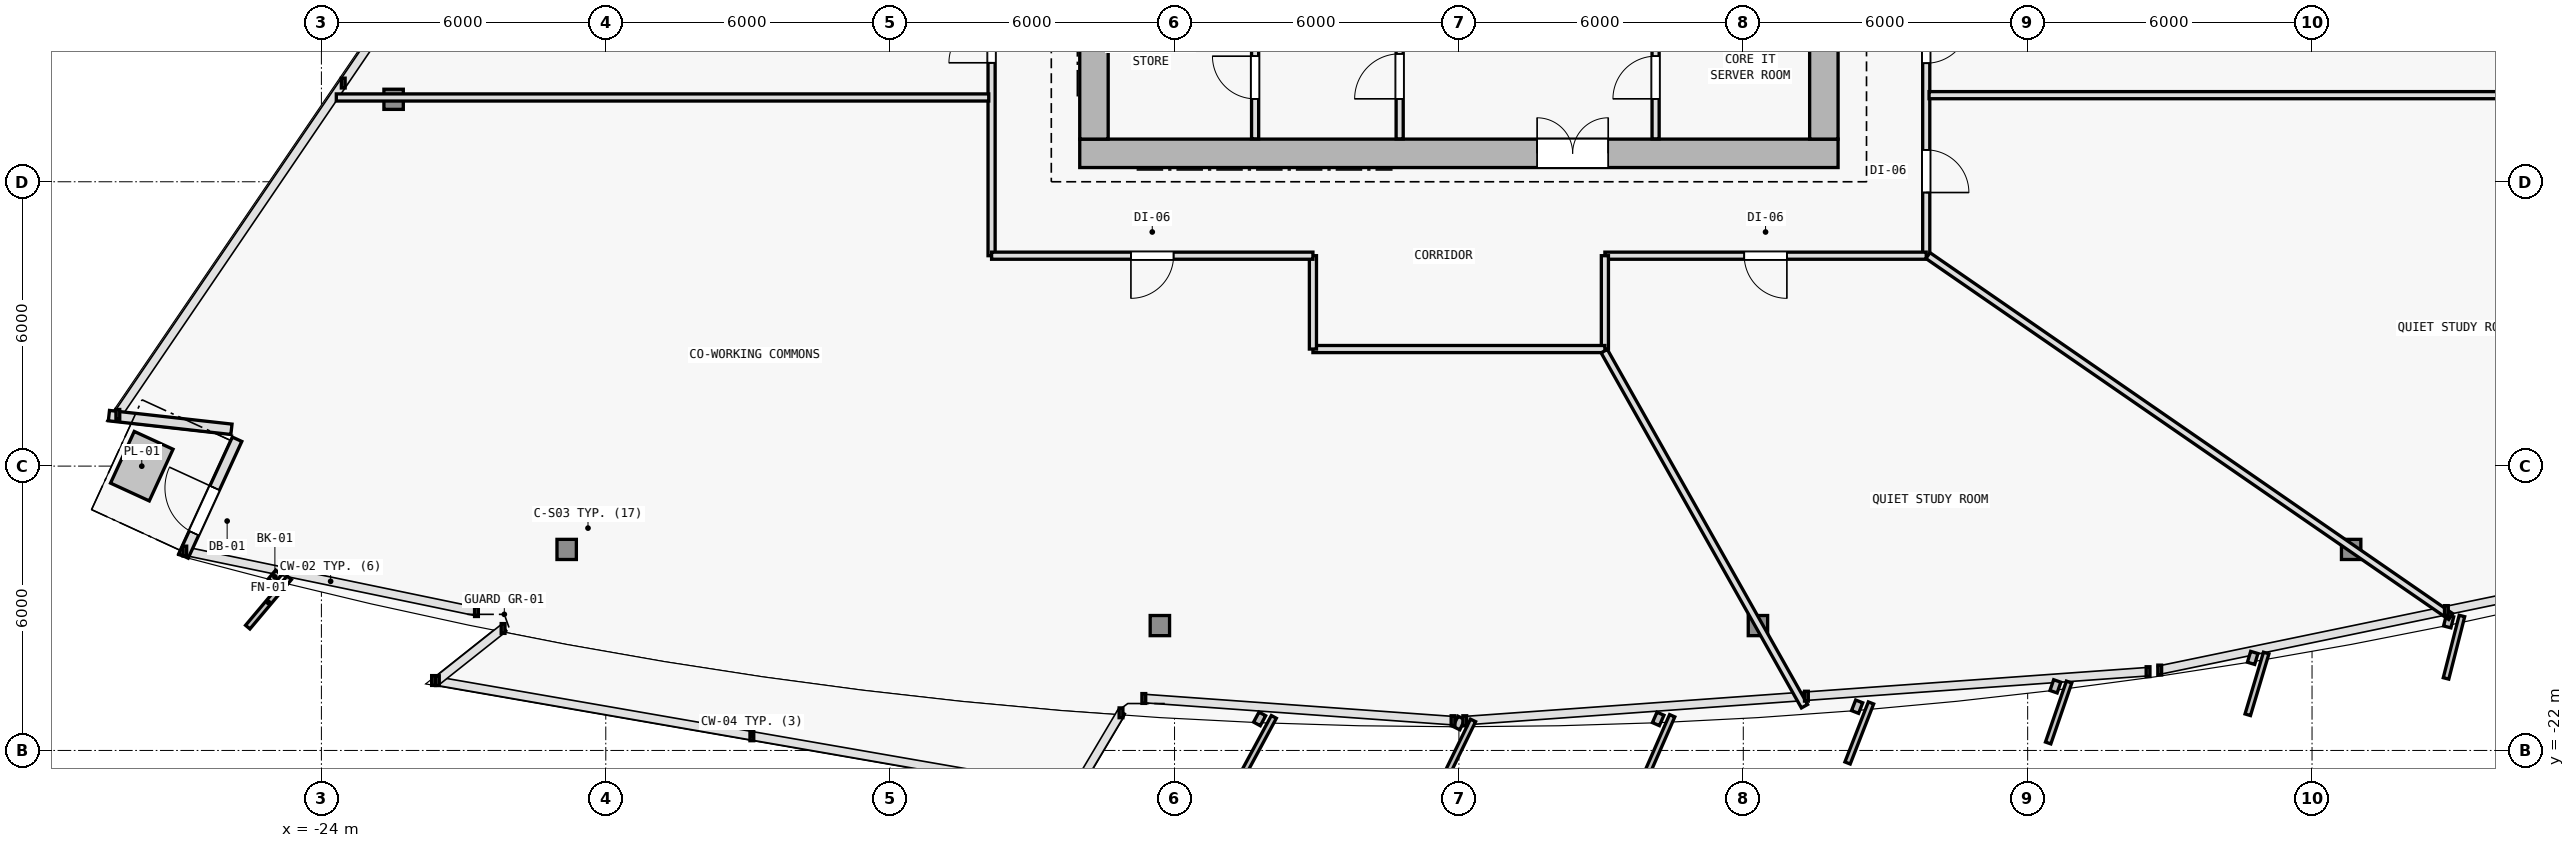
"""IFC4 building model, lengths in metres.
Left out: names, types, materials, properties, quantities, classifications, styles, units other than length and angle.
Written with IfcOpenShell. Run it as: python <this file> out.ifc"""

import sys

from ifc_helpers import new_model, si_unit, direction, frame, frame_2d, origin, origin_2d, place, context, subcontext, project, spatial, rectangle, i_section, extrude, element, fill, save


model = new_model("IFC4")
c1 = context("Model", 3, precision=1e-05, world=origin(), true_north=direction((0.0, 1.0)))
c2 = subcontext(c1, "Body", "Model", "MODEL_VIEW")
j1 = project(units=[si_unit("LENGTHUNIT", "METRE"), si_unit("PLANEANGLEUNIT", "RADIAN")], contexts=[c1])
p1 = place(None, origin())
s1 = spatial("IfcSite", under=j1, at=p1, CompositionType="ELEMENT")
p2 = place(p1, origin())
s2 = spatial("IfcBuilding", under=s1, at=p2, CompositionType="ELEMENT")
p3 = place(p2, frame((0.0, 0.0, 104.1)))
s3 = spatial("IfcBuildingStorey", under=s2, at=p3, CompositionType="ELEMENT", Elevation=104.1)
for number, where, z_axis, x_axis in (
    (1, (-7.7, -9.4, 0.0), (0.0, 0.0, 1.0), (1.0, 0.0, 0.0)),
    (2, (7.7, -9.4, 0.0), (0.0, 0.0, 1.0), (1.0, 0.0, 0.0)),
    (3, (0.0, -9.4, 0.0), (0.0, 0.0, 1.0), (1.0, 0.0, 0.0)),
):
    element("IfcColumn", number, at=place(p3, frame(where, z_axis=z_axis, x_axis=x_axis)), inside=s3, PredefinedType="COLUMN", context=c2, shape_type="SweptSolid", body=[
        extrude(i_section(OverallWidth=0.409, OverallDepth=0.425, WebThickness=0.021, FlangeThickness=0.034, FilletRadius=0.015, at=origin_2d()), origin(), (0.0, 0.0, 1.0), 3.6),
    ])
p4 = place(p3, frame((-18.825, -17.758, 0.005), z_axis=(0.020594893987, 0.033509183946, 0.999226193078), x_axis=(-0.851954850327, 0.523615252838, 0.0)))
e4 = element("IfcColumn", 4, at=p4, inside=s3, PredefinedType="COLUMN", context=c2, shape_type="SweptSolid", body=[
    extrude(i_section(OverallWidth=0.409, OverallDepth=0.425, WebThickness=0.021, FlangeThickness=0.034, FilletRadius=0.015, at=origin_2d()), origin(), (0.0, 0.0, 1.0), 3.592),
])
for number, where, z_axis, x_axis in (
    (5, (-6.309, -19.365, 0.005), (0.007, 0.035, 0.999), (-0.981, 0.193, 0.0)),
    (6, (6.309, -19.365, 0.005), (-0.007, 0.035, 0.999), (-0.981, -0.193, 0.0)),
):
    element("IfcColumn", number, at=place(p3, frame(where, z_axis=z_axis, x_axis=x_axis)), inside=s3, PredefinedType="COLUMN", context=c2, shape_type="SweptSolid", body=[
        extrude(i_section(OverallWidth=0.409, OverallDepth=0.425, WebThickness=0.021, FlangeThickness=0.034, FilletRadius=0.015, at=origin_2d()), origin(), (0.0, 0.0, 1.0), 3.592),
    ])
p5 = place(p3, frame((18.825, -17.758, 0.005), z_axis=(-0.020594893987, 0.033509183946, 0.999226193078), x_axis=(-0.851954850327, -0.523615252838, 0.0)))
e7 = element("IfcColumn", 7, at=p5, inside=s3, PredefinedType="COLUMN", context=c2, shape_type="SweptSolid", body=[
    extrude(i_section(OverallWidth=0.409, OverallDepth=0.425, WebThickness=0.021, FlangeThickness=0.034, FilletRadius=0.015, at=origin_2d()), origin(), (0.0, 0.0, 1.0), 3.592),
])
p6 = place(p3, frame((-22.477, -8.26, 0.005), z_axis=(0.025222486673, 0.021551289152, 0.999449532544), x_axis=(-0.649609258817, 0.760268249278, 0.0)))
e8 = element("IfcColumn", 8, at=p6, inside=s3, PredefinedType="COLUMN", context=c2, shape_type="SweptSolid", body=[
    extrude(i_section(OverallWidth=0.409, OverallDepth=0.425, WebThickness=0.021, FlangeThickness=0.034, FilletRadius=0.015, at=origin_2d()), origin(), (0.0, 0.0, 1.0), 3.591),
])
p7 = place(p3, frame((-25.898, -15.223, 0.0), z_axis=(0.0, 0.0, 1.0), x_axis=(-0.993827522589, 0.110936267041, 0.0)))
e9 = element("IfcWall", 9, at=p7, inside=s3, PredefinedType="SOLIDWALL", context=c2, shape_type="SweptSolid", body=[
    extrude(rectangle(XDim=2.601, YDim=0.22, at=frame_2d((1.301, 0.0))), origin(), (0.0, 0.0, 1.0), 3.35),
])
p8 = place(p3, frame((-26.911, -17.897, 0.0), z_axis=(0.0, 0.0, 1.0), x_axis=(0.417504190978, 0.908674997189, 0.0)))
e10 = element("IfcWall", 10, at=p8, inside=s3, PredefinedType="SOLIDWALL", context=c2, shape_type="SweptSolid", body=[
    extrude(rectangle(XDim=2.711, YDim=0.22, at=frame_2d((1.355, 0.0))), origin(), (0.0, 0.0, 1.0), 3.35),
])
p9 = place(p8, frame((0.531, 0.0, 0.0)))
e11 = element("IfcOpeningElement", 11, at=p9, cuts=e10, PredefinedType="OPENING", context=c2, shape_type="SweptSolid", body=[
    extrude(rectangle(XDim=1.05, YDim=2.15, at=frame_2d((0.525, 1.075))), frame((0.0, 0.12, 0.0), z_axis=(0.0, -1.0, 0.0), x_axis=(1.0, 0.0, 0.0)), (0.0, 0.0, 1.0), 0.24),
])
p10 = place(p3, frame((-8.0, -9.4, 0.0), z_axis=(0.0, 0.0, 1.0), x_axis=(1.0, 0.0, 0.0)))
e12 = element("IfcWall", 12, at=p10, inside=s3, PredefinedType="SHEAR", context=c2, shape_type="SweptSolid", body=[
    extrude(rectangle(XDim=16.0, YDim=0.6, at=frame_2d((8.0, 0.0))), origin(), (0.0, 0.0, 1.0), 3.35),
])
p11 = place(p10, frame((9.65, 0.0, 0.0)))
e13 = element("IfcOpeningElement", 13, at=p11, cuts=e12, PredefinedType="OPENING", context=c2, shape_type="SweptSolid", body=[
    extrude(rectangle(XDim=1.5, YDim=2.2, at=frame_2d((0.75, 1.1))), frame((0.0, 0.31, 0.0), z_axis=(0.0, -1.0, 0.0), x_axis=(1.0, 0.0, 0.0)), (0.0, 0.0, 1.0), 0.62),
])
p12 = place(p3, frame((-7.7, -9.1, 0.0), z_axis=(0.0, 0.0, 1.0), x_axis=(0.0, 1.0, 0.0)))
e14 = element("IfcWall", 14, at=p12, inside=s3, PredefinedType="SHEAR", context=c2, shape_type="SweptSolid", body=[
    extrude(rectangle(XDim=19.0, YDim=0.6, at=frame_2d((9.5, 0.0))), origin(), (0.0, 0.0, 1.0), 3.35),
])
p13 = place(p12, frame((12.65, 0.0, 0.0)))
e15 = element("IfcOpeningElement", 15, at=p13, cuts=e14, PredefinedType="OPENING", context=c2, shape_type="SweptSolid", body=[
    extrude(rectangle(XDim=1.1, YDim=2.15, at=frame_2d((0.55, 1.075))), frame((0.0, 0.31, 0.0), z_axis=(0.0, -1.0, 0.0), x_axis=(1.0, 0.0, 0.0)), (0.0, 0.0, 1.0), 0.62),
])
p14 = place(p3, frame((7.7, 9.9, 0.0), z_axis=(0.0, 0.0, 1.0), x_axis=(0.0, -1.0, 0.0)))
e16 = element("IfcWall", 16, at=p14, inside=s3, PredefinedType="SHEAR", context=c2, shape_type="SweptSolid", body=[
    extrude(rectangle(XDim=19.0, YDim=0.6, at=frame_2d((9.5, 0.0))), origin(), (0.0, 0.0, 1.0), 3.35),
])
p15 = place(p3, frame((-1.25, -9.095, 0.0), z_axis=(0.0, 0.0, 1.0), x_axis=(0.0, 1.0, 0.0)))
e17 = element("IfcWall", 17, at=p15, inside=s3, PredefinedType="PARTITIONING", context=c2, shape_type="SweptSolid", body=[
    extrude(rectangle(XDim=3.045, YDim=0.15, at=frame_2d((1.522, 0.0))), origin(), (0.0, 0.0, 1.0), 3.35),
])
p16 = place(p15, frame((0.845, 0.0, 0.0)))
e18 = element("IfcOpeningElement", 18, at=p16, cuts=e17, PredefinedType="OPENING", context=c2, shape_type="SweptSolid", body=[
    extrude(rectangle(XDim=0.95, YDim=2.1, at=frame_2d((0.475, 1.05))), frame((0.0, 0.085, 0.0), z_axis=(0.0, -1.0, 0.0), x_axis=(1.0, 0.0, 0.0)), (0.0, 0.0, 1.0), 0.17),
])
p17 = place(p3, frame((4.15, -9.095, 0.0), z_axis=(0.0, 0.0, 1.0), x_axis=(0.0, 1.0, 0.0)))
e19 = element("IfcWall", 19, at=p17, inside=s3, PredefinedType="PARTITIONING", context=c2, shape_type="SweptSolid", body=[
    extrude(rectangle(XDim=3.045, YDim=0.15, at=frame_2d((1.522, 0.0))), origin(), (0.0, 0.0, 1.0), 3.35),
])
p18 = place(p17, frame((0.845, 0.0, 0.0)))
e20 = element("IfcOpeningElement", 20, at=p18, cuts=e19, PredefinedType="OPENING", context=c2, shape_type="SweptSolid", body=[
    extrude(rectangle(XDim=0.9, YDim=2.1, at=frame_2d((0.45, 1.05))), frame((0.0, 0.085, 0.0), z_axis=(0.0, -1.0, 0.0), x_axis=(1.0, 0.0, 0.0)), (0.0, 0.0, 1.0), 0.17),
])
p19 = place(p3, frame((-4.3, -9.095, 0.0), z_axis=(0.0, 0.0, 1.0), x_axis=(0.0, 1.0, 0.0)))
e21 = element("IfcWall", 21, at=p19, inside=s3, PredefinedType="PARTITIONING", context=c2, shape_type="SweptSolid", body=[
    extrude(rectangle(XDim=3.045, YDim=0.15, at=frame_2d((1.522, 0.0))), origin(), (0.0, 0.0, 1.0), 3.35),
])
p20 = place(p19, frame((0.845, 0.0, 0.0)))
e22 = element("IfcOpeningElement", 22, at=p20, cuts=e21, PredefinedType="OPENING", context=c2, shape_type="SweptSolid", body=[
    extrude(rectangle(XDim=0.9, YDim=2.1, at=frame_2d((0.45, 1.05))), frame((0.0, 0.085, 0.0), z_axis=(0.0, -1.0, 0.0), x_axis=(1.0, 0.0, 0.0)), (0.0, 0.0, 1.0), 0.17),
])
p21 = place(p3, frame((-9.86, -11.56, 0.0), z_axis=(0.0, 0.0, 1.0), x_axis=(0.0, 1.0, 0.0)))
e23 = element("IfcWall", 23, at=p21, inside=s3, PredefinedType="PARTITIONING", context=c2, shape_type="SweptSolid", body=[
    extrude(rectangle(XDim=19.986, YDim=0.15, at=frame_2d((9.993, 0.0))), origin(), (0.0, 0.0, 1.0), 2.705),
])
p22 = place(p21, frame((10.614, 0.0, 0.0)))
e24 = element("IfcOpeningElement", 24, at=p22, cuts=e23, PredefinedType="OPENING", context=c2, shape_type="SweptSolid", body=[
    extrude(rectangle(XDim=0.9, YDim=2.1, at=frame_2d((0.45, 1.05))), frame((0.0, 0.085, 0.0), z_axis=(0.0, -1.0, 0.0), x_axis=(1.0, 0.0, 0.0)), (0.0, 0.0, 1.0), 0.17),
])
p23 = place(p21, frame((8.615, 0.0, 0.0)))
e25 = element("IfcOpeningElement", 25, at=p23, cuts=e23, PredefinedType="OPENING", context=c2, shape_type="SweptSolid", body=[
    extrude(rectangle(XDim=0.9, YDim=2.1, at=frame_2d((0.45, 1.05))), frame((0.0, 0.085, 0.0), z_axis=(0.0, -1.0, 0.0), x_axis=(1.0, 0.0, 0.0)), (0.0, 0.0, 1.0), 0.17),
])
p24 = place(p21, frame((6.434, 0.0, 0.0)))
e26 = element("IfcOpeningElement", 26, at=p24, cuts=e23, PredefinedType="OPENING", context=c2, shape_type="SweptSolid", body=[
    extrude(rectangle(XDim=0.9, YDim=2.1, at=frame_2d((0.45, 1.05))), frame((0.0, 0.085, 0.0), z_axis=(0.0, -1.0, 0.0), x_axis=(1.0, 0.0, 0.0)), (0.0, 0.0, 1.0), 0.17),
])
p25 = place(p21, frame((4.071, 0.0, 0.0)))
e27 = element("IfcOpeningElement", 27, at=p25, cuts=e23, PredefinedType="OPENING", context=c2, shape_type="SweptSolid", body=[
    extrude(rectangle(XDim=0.9, YDim=2.1, at=frame_2d((0.45, 1.05))), frame((0.0, 0.085, 0.0), z_axis=(0.0, -1.0, 0.0), x_axis=(1.0, 0.0, 0.0)), (0.0, 0.0, 1.0), 0.17),
])
p26 = place(p21, frame((15.485, 0.0, 0.0)))
e28 = element("IfcOpeningElement", 28, at=p26, cuts=e23, PredefinedType="OPENING", context=c2, shape_type="SweptSolid", body=[
    extrude(rectangle(XDim=0.9, YDim=2.1, at=frame_2d((0.45, 1.05))), frame((0.0, 0.085, 0.0), z_axis=(0.0, -1.0, 0.0), x_axis=(1.0, 0.0, 0.0)), (0.0, 0.0, 1.0), 0.17),
])
p27 = place(p3, frame((9.86, 8.426, 0.0), z_axis=(0.0, 0.0, 1.0), x_axis=(0.0, -1.0, 0.0)))
e29 = element("IfcWall", 29, at=p27, inside=s3, PredefinedType="PARTITIONING", context=c2, shape_type="SweptSolid", body=[
    extrude(rectangle(XDim=19.986, YDim=0.15, at=frame_2d((9.993, 0.0))), origin(), (0.0, 0.0, 1.0), 2.705),
])
p28 = place(p27, frame((17.753, 0.0, 0.0)))
e30 = element("IfcOpeningElement", 30, at=p28, cuts=e29, PredefinedType="OPENING", context=c2, shape_type="SweptSolid", body=[
    extrude(rectangle(XDim=0.9, YDim=2.1, at=frame_2d((0.45, 1.05))), frame((0.0, 0.085, 0.0), z_axis=(0.0, -1.0, 0.0), x_axis=(1.0, 0.0, 0.0)), (0.0, 0.0, 1.0), 0.17),
])
p29 = place(p27, frame((15.024, 0.0, 0.0)))
e31 = element("IfcOpeningElement", 31, at=p29, cuts=e29, PredefinedType="OPENING", context=c2, shape_type="SweptSolid", body=[
    extrude(rectangle(XDim=0.9, YDim=2.1, at=frame_2d((0.45, 1.05))), frame((0.0, 0.085, 0.0), z_axis=(0.0, -1.0, 0.0), x_axis=(1.0, 0.0, 0.0)), (0.0, 0.0, 1.0), 0.17),
])
p30 = place(p27, frame((12.777, 0.0, 0.0)))
e32 = element("IfcOpeningElement", 32, at=p30, cuts=e29, PredefinedType="OPENING", context=c2, shape_type="SweptSolid", body=[
    extrude(rectangle(XDim=0.9, YDim=2.1, at=frame_2d((0.45, 1.05))), frame((0.0, 0.085, 0.0), z_axis=(0.0, -1.0, 0.0), x_axis=(1.0, 0.0, 0.0)), (0.0, 0.0, 1.0), 0.17),
])
p31 = place(p27, frame((9.771, 0.0, 0.0)))
e33 = element("IfcOpeningElement", 33, at=p31, cuts=e29, PredefinedType="OPENING", context=c2, shape_type="SweptSolid", body=[
    extrude(rectangle(XDim=0.9, YDim=2.1, at=frame_2d((0.45, 1.05))), frame((0.0, 0.085, 0.0), z_axis=(0.0, -1.0, 0.0), x_axis=(1.0, 0.0, 0.0)), (0.0, 0.0, 1.0), 0.17),
])
p32 = place(p27, frame((5.825, 0.0, 0.0)))
e34 = element("IfcOpeningElement", 34, at=p32, cuts=e29, PredefinedType="OPENING", context=c2, shape_type="SweptSolid", body=[
    extrude(rectangle(XDim=0.9, YDim=2.1, at=frame_2d((0.45, 1.05))), frame((0.0, 0.085, 0.0), z_axis=(0.0, -1.0, 0.0), x_axis=(1.0, 0.0, 0.0)), (0.0, 0.0, 1.0), 0.17),
])
p33 = place(p27, frame((1.744, 0.0, 0.0)))
e35 = element("IfcOpeningElement", 35, at=p33, cuts=e29, PredefinedType="OPENING", context=c2, shape_type="SweptSolid", body=[
    extrude(rectangle(XDim=0.9, YDim=2.1, at=frame_2d((0.45, 1.05))), frame((0.0, 0.085, 0.0), z_axis=(0.0, -1.0, 0.0), x_axis=(1.0, 0.0, 0.0)), (0.0, 0.0, 1.0), 0.17),
])
p34 = place(p3, frame((9.86, -11.56, 0.0), z_axis=(0.0, 0.0, 1.0), x_axis=(-1.0, 0.0, 0.0)))
e36 = element("IfcWall", 36, at=p34, inside=s3, PredefinedType="PARTITIONING", context=c2, shape_type="SweptSolid", body=[
    extrude(rectangle(XDim=6.78, YDim=0.15, at=frame_2d((3.39, 0.0))), origin(), (0.0, 0.0, 1.0), 2.965),
])
p35 = place(p34, frame((2.94, 0.0, 0.0)))
e37 = element("IfcOpeningElement", 37, at=p35, cuts=e36, PredefinedType="OPENING", context=c2, shape_type="SweptSolid", body=[
    extrude(rectangle(XDim=0.9, YDim=2.1, at=frame_2d((0.45, 1.05))), frame((0.0, 0.085, 0.0), z_axis=(0.0, -1.0, 0.0), x_axis=(1.0, 0.0, 0.0)), (0.0, 0.0, 1.0), 0.17),
])
p36 = place(p3, frame((3.08, -11.56, 0.0), z_axis=(0.0, 0.0, 1.0), x_axis=(0.0, -1.0, 0.0)))
e38 = element("IfcWall", 38, at=p36, inside=s3, PredefinedType="PARTITIONING", context=c2, shape_type="SweptSolid", body=[
    extrude(rectangle(XDim=1.97, YDim=0.15, at=frame_2d((0.985, 0.0))), origin(), (0.0, 0.0, 1.0), 2.965),
])
p37 = place(p3, frame((3.08, -13.53, 0.0), z_axis=(0.0, 0.0, 1.0), x_axis=(-1.0, 0.0, 0.0)))
e39 = element("IfcWall", 39, at=p37, inside=s3, PredefinedType="PARTITIONING", context=c2, shape_type="SweptSolid", body=[
    extrude(rectangle(XDim=6.16, YDim=0.15, at=frame_2d((3.08, 0.0))), origin(), (0.0, 0.0, 1.0), 2.775),
])
p38 = place(p3, frame((-3.08, -13.53, 0.0), z_axis=(0.0, 0.0, 1.0), x_axis=(0.0, 1.0, 0.0)))
e40 = element("IfcWall", 40, at=p38, inside=s3, PredefinedType="PARTITIONING", context=c2, shape_type="SweptSolid", body=[
    extrude(rectangle(XDim=1.97, YDim=0.15, at=frame_2d((0.985, 0.0))), origin(), (0.0, 0.0, 1.0), 2.825),
])
p39 = place(p3, frame((-3.08, -11.56, 0.0), z_axis=(0.0, 0.0, 1.0), x_axis=(-1.0, 0.0, 0.0)))
e41 = element("IfcWall", 41, at=p39, inside=s3, PredefinedType="PARTITIONING", context=c2, shape_type="SweptSolid", body=[
    extrude(rectangle(XDim=6.78, YDim=0.15, at=frame_2d((3.39, 0.0))), origin(), (0.0, 0.0, 1.0), 3.35),
])
p40 = place(p39, frame((2.94, 0.0, 0.0)))
e42 = element("IfcOpeningElement", 42, at=p40, cuts=e41, PredefinedType="OPENING", context=c2, shape_type="SweptSolid", body=[
    extrude(rectangle(XDim=0.9, YDim=2.1, at=frame_2d((0.45, 1.05))), frame((0.0, 0.085, 0.0), z_axis=(0.0, -1.0, 0.0), x_axis=(1.0, 0.0, 0.0)), (0.0, 0.0, 1.0), 0.17),
])
p41 = place(p3, frame((3.066, -13.573, 0.0), z_axis=(0.0, 0.0, 1.0), x_axis=(0.491259358146, -0.871013342627, 0.0)))
e43 = element("IfcWall", 43, at=p41, inside=s3, PredefinedType="PARTITIONING", context=c2, shape_type="SweptSolid", body=[
    extrude(rectangle(XDim=8.603, YDim=0.15, at=frame_2d((4.301, 0.0))), origin(), (0.0, 0.0, 1.0), 2.775),
])
p42 = place(p3, frame((9.896, -11.558, 0.0), z_axis=(0.0, 0.0, 1.0), x_axis=(0.82286040312, -0.568243571875, 0.0)))
e44 = element("IfcWall", 44, at=p42, inside=s3, PredefinedType="PARTITIONING", context=c2, shape_type="SweptSolid", body=[
    extrude(rectangle(XDim=13.405, YDim=0.15, at=frame_2d((6.702, 0.0))), origin(), (0.0, 0.0, 1.0), 2.775),
])
p43 = place(p3, frame((9.92, -8.173, 0.0), z_axis=(0.0, 0.0, 1.0), x_axis=(1.0, 0.0, 0.0)))
e45 = element("IfcWall", 45, at=p43, inside=s3, PredefinedType="PARTITIONING", context=c2, shape_type="SweptSolid", body=[
    extrude(rectangle(XDim=14.572, YDim=0.15, at=frame_2d((7.286, 0.0))), origin(), (0.0, 0.0, 1.0), 2.705),
])
p44 = place(p3, frame((-9.92, -8.221, 0.0), z_axis=(0.0, 0.0, 1.0), x_axis=(-1.0, 0.0, 0.0)))
e46 = element("IfcWall", 46, at=p44, inside=s3, PredefinedType="PARTITIONING", context=c2, shape_type="SweptSolid", body=[
    extrude(rectangle(XDim=13.766, YDim=0.15, at=frame_2d((6.883, 0.0))), origin(), (0.0, 0.0, 1.0), 2.705),
])
p45 = place(p9, origin())
e47 = element("IfcDoor", 47, at=p45, inside=s3, OperationType="SINGLE_SWING_RIGHT", PredefinedType="DOOR", context=c2, shape_type="SweptSolid", body=[
    extrude(rectangle(XDim=1.05, YDim=2.15, at=frame_2d((0.525, 1.075))), frame((0.0, 0.025, 0.0), z_axis=(0.0, -1.0, 0.0), x_axis=(1.0, 0.0, 0.0)), (0.0, 0.0, 1.0), 0.05),
])
fill(e11, e47)
p46 = place(p11, origin())
e48 = element("IfcDoor", 48, at=p46, inside=s3, OperationType="DOUBLE_DOOR_SINGLE_SWING", PredefinedType="DOOR", context=c2, shape_type="SweptSolid", body=[
    extrude(rectangle(XDim=1.5, YDim=2.2, at=frame_2d((0.75, 1.1))), frame((0.0, 0.025, 0.0), z_axis=(0.0, -1.0, 0.0), x_axis=(1.0, 0.0, 0.0)), (0.0, 0.0, 1.0), 0.05),
])
fill(e13, e48)
p47 = place(p16, origin())
e49 = element("IfcDoor", 49, at=p47, inside=s3, OperationType="SINGLE_SWING_LEFT", PredefinedType="DOOR", context=c2, shape_type="SweptSolid", body=[
    extrude(rectangle(XDim=0.95, YDim=2.1, at=frame_2d((0.475, 1.05))), frame((0.0, 0.025, 0.0), z_axis=(0.0, -1.0, 0.0), x_axis=(1.0, 0.0, 0.0)), (0.0, 0.0, 1.0), 0.05),
])
fill(e18, e49)
p48 = place(p20, origin())
e50 = element("IfcDoor", 50, at=p48, inside=s3, OperationType="SINGLE_SWING_RIGHT", PredefinedType="DOOR", context=c2, shape_type="SweptSolid", body=[
    extrude(rectangle(XDim=0.9, YDim=2.1, at=frame_2d((0.45, 1.05))), frame((0.0, 0.025, 0.0), z_axis=(0.0, -1.0, 0.0), x_axis=(1.0, 0.0, 0.0)), (0.0, 0.0, 1.0), 0.05),
])
fill(e22, e50)
p49 = place(p18, origin())
e51 = element("IfcDoor", 51, at=p49, inside=s3, OperationType="SINGLE_SWING_LEFT", PredefinedType="DOOR", context=c2, shape_type="SweptSolid", body=[
    extrude(rectangle(XDim=0.9, YDim=2.1, at=frame_2d((0.45, 1.05))), frame((0.0, 0.025, 0.0), z_axis=(0.0, -1.0, 0.0), x_axis=(1.0, 0.0, 0.0)), (0.0, 0.0, 1.0), 0.05),
])
fill(e20, e51)
p50 = place(p25, origin())
e52 = element("IfcDoor", 52, at=p50, inside=s3, OperationType="SINGLE_SWING_LEFT", PredefinedType="DOOR", context=c2, shape_type="SweptSolid", body=[
    extrude(rectangle(XDim=0.9, YDim=2.1, at=frame_2d((0.45, 1.05))), frame((0.0, 0.025, 0.0), z_axis=(0.0, -1.0, 0.0), x_axis=(1.0, 0.0, 0.0)), (0.0, 0.0, 1.0), 0.05),
])
fill(e27, e52)
p51 = place(p40, origin())
e53 = element("IfcDoor", 53, at=p51, inside=s3, OperationType="SINGLE_SWING_RIGHT", PredefinedType="DOOR", context=c2, shape_type="SweptSolid", body=[
    extrude(rectangle(XDim=0.9, YDim=2.1, at=frame_2d((0.45, 1.05))), frame((0.0, 0.025, 0.0), z_axis=(0.0, -1.0, 0.0), x_axis=(1.0, 0.0, 0.0)), (0.0, 0.0, 1.0), 0.05),
])
fill(e42, e53)
p52 = place(p35, origin())
e54 = element("IfcDoor", 54, at=p52, inside=s3, OperationType="SINGLE_SWING_LEFT", PredefinedType="DOOR", context=c2, shape_type="SweptSolid", body=[
    extrude(rectangle(XDim=0.9, YDim=2.1, at=frame_2d((0.45, 1.05))), frame((0.0, 0.025, 0.0), z_axis=(0.0, -1.0, 0.0), x_axis=(1.0, 0.0, 0.0)), (0.0, 0.0, 1.0), 0.05),
])
fill(e37, e54)
p53 = place(p28, origin())
e55 = element("IfcDoor", 55, at=p53, inside=s3, OperationType="SINGLE_SWING_RIGHT", PredefinedType="DOOR", context=c2, shape_type="SweptSolid", body=[
    extrude(rectangle(XDim=0.9, YDim=2.1, at=frame_2d((0.45, 1.05))), frame((0.0, 0.025, 0.0), z_axis=(0.0, -1.0, 0.0), x_axis=(1.0, 0.0, 0.0)), (0.0, 0.0, 1.0), 0.05),
])
fill(e30, e55)
p54 = place(p29, origin())
e56 = element("IfcDoor", 56, at=p54, inside=s3, OperationType="SINGLE_SWING_LEFT", PredefinedType="DOOR", context=c2, shape_type="SweptSolid", body=[
    extrude(rectangle(XDim=0.9, YDim=2.1, at=frame_2d((0.45, 1.05))), frame((0.0, 0.025, 0.0), z_axis=(0.0, -1.0, 0.0), x_axis=(1.0, 0.0, 0.0)), (0.0, 0.0, 1.0), 0.05),
])
fill(e31, e56)
save(model, sys.argv[1])
